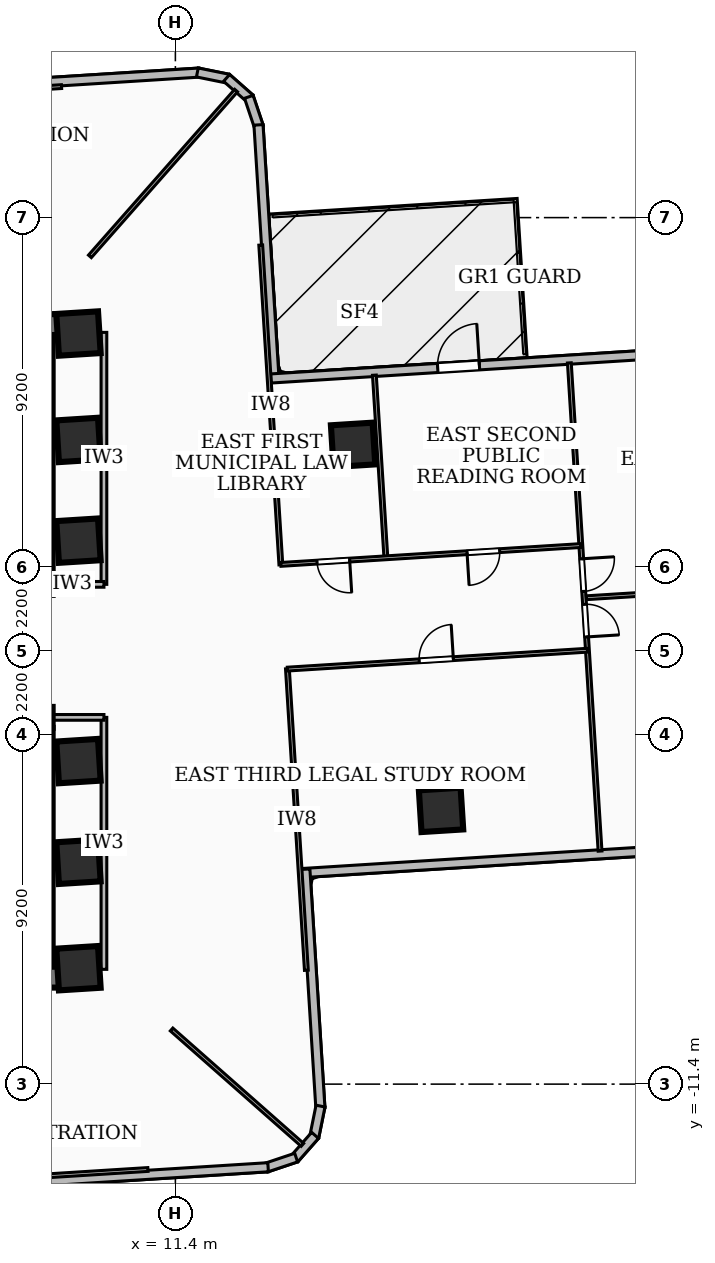
"""IFC4 building model, lengths in metres.
Left out: names, types, materials, properties, quantities, classifications, styles, units other than length and angle.
Written with IfcOpenShell. Run it as: python <this file> out.ifc"""

import sys

from ifc_helpers import new_model, si_unit, direction, frame, frame_2d, origin, origin_2d, place, context, subcontext, project, spatial, rectangle, extrude, element, fill, save


model = new_model("IFC4")
c1 = context("Model", 3, precision=1e-05, world=origin(), true_north=direction((0.0, 1.0)))
c2 = subcontext(c1, "Body", "Model", "MODEL_VIEW")
j1 = project(units=[si_unit("LENGTHUNIT", "METRE"), si_unit("PLANEANGLEUNIT", "RADIAN")], contexts=[c1])
p1 = place(None, origin())
s1 = spatial("IfcSite", under=j1, at=p1, CompositionType="ELEMENT")
p2 = place(p1, origin())
s2 = spatial("IfcBuilding", under=s1, at=p2, CompositionType="ELEMENT")
p3 = place(p2, frame((0.0, 0.0, 49.68)))
s3 = spatial("IfcBuildingStorey", under=s2, at=p3, CompositionType="ELEMENT", Elevation=49.68)
p4 = place(p3, frame((-8.78, 8.585, 0.0), z_axis=(0.0, 0.0, 1.0), x_axis=(1.0, 0.0, 0.0)))
e1 = element("IfcWall", 1, at=p4, inside=s3, PredefinedType="SHEAR", context=c2, shape_type="SweptSolid", body=[
    extrude(rectangle(XDim=17.56, YDim=0.55, at=frame_2d((8.78, 0.0))), origin(), (0.0, 0.0, 1.0), 3.32),
])
p5 = place(p3, frame((8.17, 1.75, 0.0), z_axis=(0.0, 0.0, 1.0), x_axis=(-1.0, 0.0, 0.0)))
e2 = element("IfcWall", 2, at=p5, inside=s3, PredefinedType="SHEAR", context=c2, shape_type="SweptSolid", body=[
    extrude(rectangle(XDim=16.34, YDim=0.55, at=frame_2d((8.17, 0.0))), origin(), (0.0, 0.0, 1.0), 3.32),
])
p6 = place(p5, frame((7.45, 0.0, 0.0)))
e3 = element("IfcOpeningElement", 3, at=p6, cuts=e2, PredefinedType="OPENING", context=c2, shape_type="SweptSolid", body=[
    extrude(rectangle(XDim=1.0, YDim=2.1, at=frame_2d((0.5, 1.05))), frame((0.0, 0.285, 0.0), z_axis=(0.0, -1.0, 0.0), x_axis=(1.0, 0.0, 0.0)), (0.0, 0.0, 1.0), 0.57),
])
p7 = place(p5, frame((3.85, 0.0, 0.0)))
e4 = element("IfcOpeningElement", 4, at=p7, cuts=e2, PredefinedType="OPENING", context=c2, shape_type="SweptSolid", body=[
    extrude(rectangle(XDim=0.9, YDim=2.06, at=frame_2d((0.45, 1.03))), frame((0.0, 0.285, 0.0), z_axis=(0.0, -1.0, 0.0), x_axis=(1.0, 0.0, 0.0)), (0.0, 0.0, 1.0), 0.57),
])
p8 = place(p5, frame((2.35, 0.0, 0.0)))
e5 = element("IfcOpeningElement", 5, at=p8, cuts=e2, PredefinedType="OPENING", context=c2, shape_type="SweptSolid", body=[
    extrude(rectangle(XDim=0.9, YDim=2.06, at=frame_2d((0.45, 1.03))), frame((0.0, 0.285, 0.0), z_axis=(0.0, -1.0, 0.0), x_axis=(1.0, 0.0, 0.0)), (0.0, 0.0, 1.0), 0.57),
])
p9 = place(p5, frame((0.8, 0.0, 0.0)))
e6 = element("IfcOpeningElement", 6, at=p9, cuts=e2, PredefinedType="OPENING", context=c2, shape_type="SweptSolid", body=[
    extrude(rectangle(XDim=0.9, YDim=2.06, at=frame_2d((0.45, 1.03))), frame((0.0, 0.285, 0.0), z_axis=(0.0, -1.0, 0.0), x_axis=(1.0, 0.0, 0.0)), (0.0, 0.0, 1.0), 0.57),
])
p10 = place(p3, frame((7.895, 8.31, 0.0), z_axis=(0.0, 0.0, 1.0), x_axis=(0.0, -1.0, 0.0)))
e7 = element("IfcWall", 7, at=p10, inside=s3, PredefinedType="SHEAR", context=c2, shape_type="SweptSolid", body=[
    extrude(rectangle(XDim=6.285, YDim=0.55, at=frame_2d((3.143, 0.0))), origin(), (0.0, 0.0, 1.0), 3.32),
])
p11 = place(p3, frame((8.78, -8.585, 0.0), z_axis=(0.0, 0.0, 1.0), x_axis=(-1.0, 0.0, 0.0)))
e8 = element("IfcWall", 8, at=p11, inside=s3, PredefinedType="SHEAR", context=c2, shape_type="SweptSolid", body=[
    extrude(rectangle(XDim=17.56, YDim=0.55, at=frame_2d((8.78, 0.0))), origin(), (0.0, 0.0, 1.0), 3.32),
])
p12 = place(p3, frame((-8.17, -1.75, 0.0), z_axis=(0.0, 0.0, 1.0), x_axis=(1.0, 0.0, 0.0)))
e9 = element("IfcWall", 9, at=p12, inside=s3, PredefinedType="SHEAR", context=c2, shape_type="SweptSolid", body=[
    extrude(rectangle(XDim=16.34, YDim=0.55, at=frame_2d((8.17, 0.0))), origin(), (0.0, 0.0, 1.0), 3.32),
])
p13 = place(p12, frame((7.45, 0.0, 0.0)))
e10 = element("IfcOpeningElement", 10, at=p13, cuts=e9, PredefinedType="OPENING", context=c2, shape_type="SweptSolid", body=[
    extrude(rectangle(XDim=1.0, YDim=2.1, at=frame_2d((0.5, 1.05))), frame((0.0, 0.285, 0.0), z_axis=(0.0, -1.0, 0.0), x_axis=(1.0, 0.0, 0.0)), (0.0, 0.0, 1.0), 0.57),
])
p14 = place(p12, frame((10.965, 0.0, 0.0)))
e11 = element("IfcOpeningElement", 11, at=p14, cuts=e9, PredefinedType="OPENING", context=c2, shape_type="SweptSolid", body=[
    extrude(rectangle(XDim=1.05, YDim=2.15, at=frame_2d((0.525, 1.075))), frame((0.0, 0.285, 0.0), z_axis=(0.0, -1.0, 0.0), x_axis=(1.0, 0.0, 0.0)), (0.0, 0.0, 1.0), 0.57),
])
p15 = place(p12, frame((12.525, 0.0, 0.0)))
e12 = element("IfcOpeningElement", 12, at=p15, cuts=e9, PredefinedType="OPENING", context=c2, shape_type="SweptSolid", body=[
    extrude(rectangle(XDim=1.05, YDim=2.15, at=frame_2d((0.525, 1.075))), frame((0.0, 0.285, 0.0), z_axis=(0.0, -1.0, 0.0), x_axis=(1.0, 0.0, 0.0)), (0.0, 0.0, 1.0), 0.57),
])
p16 = place(p12, frame((14.085, 0.0, 0.0)))
e13 = element("IfcOpeningElement", 13, at=p16, cuts=e9, PredefinedType="OPENING", context=c2, shape_type="SweptSolid", body=[
    extrude(rectangle(XDim=1.05, YDim=2.15, at=frame_2d((0.525, 1.075))), frame((0.0, 0.285, 0.0), z_axis=(0.0, -1.0, 0.0), x_axis=(1.0, 0.0, 0.0)), (0.0, 0.0, 1.0), 0.57),
])
p17 = place(p3, frame((7.895, -2.025, 0.0), z_axis=(0.0, 0.0, 1.0), x_axis=(0.0, -1.0, 0.0)))
e14 = element("IfcWall", 14, at=p17, inside=s3, PredefinedType="SHEAR", context=c2, shape_type="SweptSolid", body=[
    extrude(rectangle(XDim=6.285, YDim=0.55, at=frame_2d((3.143, 0.0))), origin(), (0.0, 0.0, 1.0), 3.32),
])
for number, where, z_axis, x_axis in (
    (15, (8.85, -5.55, 0.0), (0.0, 0.0, 1.0), (0.998, 0.063, 0.0)),
    (16, (8.85, -2.9, 0.0), (0.0, 0.0, 1.0), (0.998, 0.063, 0.0)),
    (17, (8.85, 2.9, 0.0), (0.0, 0.0, 1.0), (0.998, 0.063, 0.0)),
    (18, (8.85, 5.55, 0.0), (0.0, 0.0, 1.0), (0.998, 0.063, 0.0)),
    (19, (8.85, -8.35, 0.0), (0.0, 0.0, 1.0), (0.998, 0.063, 0.0)),
    (20, (8.85, 8.35, 0.0), (0.0, 0.0, 1.0), (0.998, 0.063, 0.0)),
    (21, (18.391, -4.184, 0.0), (0.0, 0.0, 1.0), (0.998, 0.063, 0.0)),
    (22, (16.076, 5.421, 0.0), (0.0, 0.0, 1.0), (0.998, 0.063, 0.0)),
):
    element("IfcColumn", number, at=place(p3, frame(where, z_axis=z_axis, x_axis=x_axis)), inside=s3, PredefinedType="COLUMN", context=c2, shape_type="SweptSolid", body=[
        extrude(rectangle(XDim=1.1, YDim=1.1, at=origin_2d()), origin(), (0.0, 0.0, 1.0), 3.6),
    ])
p18 = place(p3, frame((5.745, 14.82, 0.0), z_axis=(0.0, 0.0, 1.0), x_axis=(0.998019696231, 0.062902193405, 0.0)))
e23 = element("IfcWall", 23, at=p18, inside=s3, PredefinedType="SOLIDWALL", context=c2, shape_type="SweptSolid", body=[
    extrude(rectangle(XDim=6.295, YDim=0.24, at=frame_2d((3.148, 0.0))), origin(), (0.0, 0.0, 1.0), 2.401),
])
p19 = place(p3, frame((11.978, 15.219, 0.0), z_axis=(0.0, 0.0, 1.0), x_axis=(0.980057147523, -0.198715846348, 0.0)))
e24 = element("IfcWall", 24, at=p19, inside=s3, PredefinedType="SOLIDWALL", context=c2, shape_type="SweptSolid", body=[
    extrude(rectangle(XDim=0.831, YDim=0.24, at=frame_2d((0.415, 0.0))), origin(), (0.0, 0.0, 1.0), 3.32),
])
p20 = place(p3, frame((12.748, 15.076, 0.0), z_axis=(0.0, 0.0, 1.0), x_axis=(0.750588777208, -0.66076961759, 0.0)))
e25 = element("IfcWall", 25, at=p20, inside=s3, PredefinedType="SOLIDWALL", context=c2, shape_type="SweptSolid", body=[
    extrude(rectangle(XDim=0.815, YDim=0.24, at=frame_2d((0.408, 0.0))), origin(), (0.0, 0.0, 1.0), 3.32),
])
p21 = place(p3, frame((13.333, 14.578, 0.0), z_axis=(0.0, 0.0, 1.0), x_axis=(0.317992207862, -0.948093326492, 0.0)))
e26 = element("IfcWall", 26, at=p21, inside=s3, PredefinedType="SOLIDWALL", context=c2, shape_type="SweptSolid", body=[
    extrude(rectangle(XDim=0.83, YDim=0.24, at=frame_2d((0.415, 0.0))), origin(), (0.0, 0.0, 1.0), 3.32),
])
p22 = place(p3, frame((13.587, 13.84, 0.0), z_axis=(0.0, 0.0, 1.0), x_axis=(0.062867237505, -0.998021898782, 0.0)))
e27 = element("IfcWall", 27, at=p22, inside=s3, PredefinedType="SOLIDWALL", context=c2, shape_type="SweptSolid", body=[
    extrude(rectangle(XDim=6.777, YDim=0.24, at=frame_2d((3.388, 0.0))), origin(), (0.0, 0.0, 1.0), 2.624),
])
p23 = place(p3, frame((13.911, 7.167, 0.0), z_axis=(0.0, 0.0, 1.0), x_axis=(0.99802143782, 0.062874554885, 0.0)))
e28 = element("IfcWall", 28, at=p23, inside=s3, PredefinedType="SOLIDWALL", context=c2, shape_type="SweptSolid", body=[
    extrude(rectangle(XDim=16.875, YDim=0.24, at=frame_2d((8.438, 0.0))), origin(), (0.0, 0.0, 1.0), 2.624),
])
p24 = place(p23, frame((4.4, 0.0, 0.0)))
e29 = element("IfcOpeningElement", 29, at=p24, cuts=e28, PredefinedType="OPENING", context=c2, shape_type="SweptSolid", body=[
    extrude(rectangle(XDim=1.1, YDim=2.1, at=frame_2d((0.55, 1.05))), frame((0.0, 0.13, 0.0), z_axis=(0.0, -1.0, 0.0), x_axis=(1.0, 0.0, 0.0)), (0.0, 0.0, 1.0), 0.26),
])
p25 = place(p3, frame((31.572, -4.787, 0.0), z_axis=(0.0, 0.0, 1.0), x_axis=(-0.998025974342, -0.062802504235, 0.0)))
e30 = element("IfcWall", 30, at=p25, inside=s3, PredefinedType="SOLIDWALL", context=c2, shape_type="SweptSolid", body=[
    extrude(rectangle(XDim=16.875, YDim=0.24, at=frame_2d((8.438, 0.0))), origin(), (0.0, 0.0, 1.0), 3.32),
])
p26 = place(p25, frame((1.1, 0.0, 0.85)))
e31 = element("IfcOpeningElement", 31, at=p26, cuts=e30, PredefinedType="OPENING", context=c2, shape_type="SweptSolid", body=[
    extrude(rectangle(XDim=2.4, YDim=2.1, at=frame_2d((1.2, 1.05))), frame((0.0, 0.13, 0.0), z_axis=(0.0, -1.0, 0.0), x_axis=(1.0, 0.0, 0.0)), (0.0, 0.0, 1.0), 0.26),
])
p27 = place(p3, frame((14.82, -5.745, 0.0), z_axis=(0.0, 0.0, 1.0), x_axis=(0.062902193405, -0.998019696231, 0.0)))
e32 = element("IfcWall", 32, at=p27, inside=s3, PredefinedType="SOLIDWALL", context=c2, shape_type="SweptSolid", body=[
    extrude(rectangle(XDim=6.295, YDim=0.24, at=frame_2d((3.148, 0.0))), origin(), (0.0, 0.0, 1.0), 3.32),
])
p28 = place(p3, frame((15.219, -11.978, 0.0), z_axis=(0.0, 0.0, 1.0), x_axis=(-0.198715846348, -0.980057147523, 0.0)))
e33 = element("IfcWall", 33, at=p28, inside=s3, PredefinedType="SOLIDWALL", context=c2, shape_type="SweptSolid", body=[
    extrude(rectangle(XDim=0.831, YDim=0.24, at=frame_2d((0.415, 0.0))), origin(), (0.0, 0.0, 1.0), 3.32),
])
p29 = place(p3, frame((15.076, -12.748, 0.0), z_axis=(0.0, 0.0, 1.0), x_axis=(-0.66076961759, -0.750588777208, 0.0)))
e34 = element("IfcWall", 34, at=p29, inside=s3, PredefinedType="SOLIDWALL", context=c2, shape_type="SweptSolid", body=[
    extrude(rectangle(XDim=0.815, YDim=0.24, at=frame_2d((0.408, 0.0))), origin(), (0.0, 0.0, 1.0), 3.32),
])
p30 = place(p3, frame((14.578, -13.333, 0.0), z_axis=(0.0, 0.0, 1.0), x_axis=(-0.948093326492, -0.317992207862, 0.0)))
e35 = element("IfcWall", 35, at=p30, inside=s3, PredefinedType="SOLIDWALL", context=c2, shape_type="SweptSolid", body=[
    extrude(rectangle(XDim=0.83, YDim=0.24, at=frame_2d((0.415, 0.0))), origin(), (0.0, 0.0, 1.0), 3.32),
])
p31 = place(p3, frame((13.84, -13.587, 0.0), z_axis=(0.0, 0.0, 1.0), x_axis=(-0.998021898782, -0.062867237505, 0.0)))
e36 = element("IfcWall", 36, at=p31, inside=s3, PredefinedType="SOLIDWALL", context=c2, shape_type="SweptSolid", body=[
    extrude(rectangle(XDim=6.777, YDim=0.24, at=frame_2d((3.388, 0.0))), origin(), (0.0, 0.0, 1.0), 3.32),
])
p32 = place(p3, frame((9.52, 1.75, 0.0), z_axis=(0.0, 0.0, 1.0), x_axis=(0.0, 1.0, 0.0)))
e37 = element("IfcWall", 37, at=p32, inside=s3, PredefinedType="PARTITIONING", context=c2, shape_type="SweptSolid", body=[
    extrude(rectangle(XDim=6.63, YDim=0.15, at=frame_2d((3.315, 0.0))), origin(), (0.0, 0.0, 1.0), 2.401),
])
p33 = place(p3, frame((7.85, 1.75, 0.0), z_axis=(0.0, 0.0, 1.0), x_axis=(1.0, 0.0, 0.0)))
e38 = element("IfcWall", 38, at=p33, inside=s3, PredefinedType="PARTITIONING", context=c2, shape_type="SweptSolid", body=[
    extrude(rectangle(XDim=1.67, YDim=0.15, at=frame_2d((0.835, 0.0))), origin(), (0.0, 0.0, 1.0), 2.385),
])
p34 = place(p3, frame((9.52, -8.38, 0.0), z_axis=(0.0, 0.0, 1.0), x_axis=(0.0, 1.0, 0.0)))
e39 = element("IfcWall", 39, at=p34, inside=s3, PredefinedType="PARTITIONING", context=c2, shape_type="SweptSolid", body=[
    extrude(rectangle(XDim=6.63, YDim=0.15, at=frame_2d((3.315, 0.0))), origin(), (0.0, 0.0, 1.0), 2.401),
])
p35 = place(p3, frame((7.85, -1.75, 0.0), z_axis=(0.0, 0.0, 1.0), x_axis=(1.0, 0.0, 0.0)))
e40 = element("IfcWall", 40, at=p35, inside=s3, PredefinedType="PARTITIONING", context=c2, shape_type="SweptSolid", body=[
    extrude(rectangle(XDim=1.67, YDim=0.15, at=frame_2d((0.835, 0.0))), origin(), (0.0, 0.0, 1.0), 2.385),
])
p36 = place(p3, frame((9.151, 10.38, 0.0), z_axis=(0.0, 0.0, 1.0), x_axis=(0.661373124857, 0.750057057641, 0.0)))
e41 = element("IfcWall", 41, at=p36, inside=s3, PredefinedType="PARTITIONING", context=c2, shape_type="SweptSolid", body=[
    extrude(rectangle(XDim=5.817, YDim=0.1, at=frame_2d((2.908, 0.0))), origin(), (0.0, 0.0, 1.0), 2.624),
])
p37 = place(p3, frame((11.3, -9.962, 0.0), z_axis=(0.0, 0.0, 1.0), x_axis=(0.750020974917, -0.661414043686, 0.0)))
e42 = element("IfcWall", 42, at=p37, inside=s3, PredefinedType="PARTITIONING", context=c2, shape_type="SweptSolid", body=[
    extrude(rectangle(XDim=4.59, YDim=0.1, at=frame_2d((2.295, 0.0))), origin(), (0.0, 0.0, 1.0), 3.32),
])
p38 = place(p3, frame((14.176, 2.265, 0.0), z_axis=(0.0, 0.0, 1.0), x_axis=(-0.062875924382, 0.998021351542, 0.0)))
e43 = element("IfcWall", 43, at=p38, inside=s3, PredefinedType="PARTITIONING", context=c2, shape_type="SweptSolid", body=[
    extrude(rectangle(XDim=8.43, YDim=0.1, at=frame_2d((4.215, 0.0))), origin(), (0.0, 0.0, 1.0), 2.401),
])
p39 = place(p3, frame((14.847, -8.404, 0.0), z_axis=(0.0, 0.0, 1.0), x_axis=(-0.062772139706, 0.998027884619, 0.0)))
e44 = element("IfcWall", 44, at=p39, inside=s3, PredefinedType="PARTITIONING", context=c2, shape_type="SweptSolid", body=[
    extrude(rectangle(XDim=7.95, YDim=0.1, at=frame_2d((3.975, 0.0))), origin(), (0.0, 0.0, 1.0), 2.401),
])
p40 = place(p3, frame((16.938, 2.468, 0.0), z_axis=(0.0, 0.0, 1.0), x_axis=(-0.062774483496, 0.998027737201, 0.0)))
e45 = element("IfcWall", 45, at=p40, inside=s3, PredefinedType="PARTITIONING", context=c2, shape_type="SweptSolid", body=[
    extrude(rectangle(XDim=4.795, YDim=0.1, at=frame_2d((2.398, 0.0))), origin(), (0.0, 0.0, 1.0), 2.401),
])
p41 = place(p3, frame((22.07, 2.771, 0.0), z_axis=(0.0, 0.0, 1.0), x_axis=(-0.998031627252, -0.062712606425, 0.0)))
e46 = element("IfcWall", 46, at=p41, inside=s3, PredefinedType="PARTITIONING", context=c2, shape_type="SweptSolid", body=[
    extrude(rectangle(XDim=7.911, YDim=0.1, at=frame_2d((3.955, 0.0))), origin(), (0.0, 0.0, 1.0), 3.32),
])
p42 = place(p41, frame((6.096, 0.0, 0.0)))
e47 = element("IfcOpeningElement", 47, at=p42, cuts=e46, PredefinedType="OPENING", context=c2, shape_type="SweptSolid", body=[
    extrude(rectangle(XDim=0.86, YDim=2.04, at=frame_2d((0.43, 1.02))), frame((0.0, 0.06, 0.0), z_axis=(0.0, -1.0, 0.0), x_axis=(1.0, 0.0, 0.0)), (0.0, 0.0, 1.0), 0.12),
])
p43 = place(p41, frame((2.141, 0.0, 0.0)))
e48 = element("IfcOpeningElement", 48, at=p43, cuts=e46, PredefinedType="OPENING", context=c2, shape_type="SweptSolid", body=[
    extrude(rectangle(XDim=0.86, YDim=2.04, at=frame_2d((0.43, 1.02))), frame((0.0, 0.06, 0.0), z_axis=(0.0, -1.0, 0.0), x_axis=(1.0, 0.0, 0.0)), (0.0, 0.0, 1.0), 0.12),
])
p44 = place(p3, frame((14.348, -0.48, 0.0), z_axis=(0.0, 0.0, 1.0), x_axis=(0.998023893104, 0.062835569496, 0.0)))
e49 = element("IfcWall", 49, at=p44, inside=s3, PredefinedType="PARTITIONING", context=c2, shape_type="SweptSolid", body=[
    extrude(rectangle(XDim=7.911, YDim=0.1, at=frame_2d((3.955, 0.0))), origin(), (0.0, 0.0, 1.0), 3.32),
])
p45 = place(p44, frame((3.475, 0.0, 0.0)))
e50 = element("IfcOpeningElement", 50, at=p45, cuts=e49, PredefinedType="OPENING", context=c2, shape_type="SweptSolid", body=[
    extrude(rectangle(XDim=0.9, YDim=2.06, at=frame_2d((0.45, 1.03))), frame((0.0, 0.06, 0.0), z_axis=(0.0, -1.0, 0.0), x_axis=(1.0, 0.0, 0.0)), (0.0, 0.0, 1.0), 0.12),
])
p46 = place(p3, frame((22.216, 1.398, 0.0), z_axis=(0.0, 0.0, 1.0), x_axis=(0.998025462108, 0.062810643876, 0.0)))
e51 = element("IfcWall", 51, at=p46, inside=s3, PredefinedType="PARTITIONING", context=c2, shape_type="SweptSolid", body=[
    extrude(rectangle(XDim=10.335, YDim=0.1, at=frame_2d((5.168, 0.0))), origin(), (0.0, 0.0, 1.0), 2.812),
])
p47 = place(p3, frame((21.767, 7.577, 0.0), z_axis=(0.0, 0.0, 1.0), x_axis=(0.062769180357, -0.998028070746, 0.0)))
e52 = element("IfcWall", 52, at=p47, inside=s3, PredefinedType="PARTITIONING", context=c2, shape_type="SweptSolid", body=[
    extrude(rectangle(XDim=12.87, YDim=0.1, at=frame_2d((6.435, 0.0))), origin(), (0.0, 0.0, 1.0), 2.401),
])
p48 = place(p47, frame((6.365, 0.0, 0.0)))
e53 = element("IfcOpeningElement", 53, at=p48, cuts=e52, PredefinedType="OPENING", context=c2, shape_type="SweptSolid", body=[
    extrude(rectangle(XDim=0.86, YDim=2.04, at=frame_2d((0.43, 1.02))), frame((0.0, 0.06, 0.0), z_axis=(0.0, -1.0, 0.0), x_axis=(1.0, 0.0, 0.0)), (0.0, 0.0, 1.0), 0.12),
])
p49 = place(p47, frame((5.165, 0.0, 0.0)))
e54 = element("IfcOpeningElement", 54, at=p49, cuts=e52, PredefinedType="OPENING", context=c2, shape_type="SweptSolid", body=[
    extrude(rectangle(XDim=0.86, YDim=2.04, at=frame_2d((0.43, 1.02))), frame((0.0, 0.06, 0.0), z_axis=(0.0, -1.0, 0.0), x_axis=(1.0, 0.0, 0.0)), (0.0, 0.0, 1.0), 0.12),
])
p50 = place(p3, frame((8.404, 14.847, 0.0), z_axis=(0.0, 0.0, 1.0), x_axis=(-0.998027884619, -0.062772139706, 0.0)))
e55 = element("IfcWall", 55, at=p50, inside=s3, PredefinedType="PARTITIONING", context=c2, shape_type="SweptSolid", body=[
    extrude(rectangle(XDim=7.95, YDim=0.1, at=frame_2d((3.975, 0.0))), origin(), (0.0, 0.0, 1.0), 2.401),
])
p51 = place(p3, frame((2.265, -14.176, 0.0), z_axis=(0.0, 0.0, 1.0), x_axis=(0.998021351542, 0.062875924382, 0.0)))
e56 = element("IfcWall", 56, at=p51, inside=s3, PredefinedType="PARTITIONING", context=c2, shape_type="SweptSolid", body=[
    extrude(rectangle(XDim=8.43, YDim=0.1, at=frame_2d((4.215, 0.0))), origin(), (0.0, 0.0, 1.0), 2.401),
])
p52 = place(p24, origin())
e57 = element("IfcDoor", 57, at=p52, inside=s3, OperationType="SINGLE_SWING_RIGHT", PredefinedType="DOOR", context=c2, shape_type="SweptSolid", body=[
    extrude(rectangle(XDim=1.1, YDim=2.1, at=frame_2d((0.55, 1.05))), frame((0.0, 0.025, 0.0), z_axis=(0.0, -1.0, 0.0), x_axis=(1.0, 0.0, 0.0)), (0.0, 0.0, 1.0), 0.05),
])
fill(e29, e57)
p53 = place(p42, origin())
e58 = element("IfcDoor", 58, at=p53, inside=s3, OperationType="SINGLE_SWING_LEFT", PredefinedType="DOOR", context=c2, shape_type="SweptSolid", body=[
    extrude(rectangle(XDim=0.86, YDim=2.04, at=frame_2d((0.43, 1.02))), frame((0.0, 0.025, 0.0), z_axis=(0.0, -1.0, 0.0), x_axis=(1.0, 0.0, 0.0)), (0.0, 0.0, 1.0), 0.05),
])
fill(e47, e58)
p54 = place(p43, origin())
e59 = element("IfcDoor", 59, at=p54, inside=s3, OperationType="SINGLE_SWING_RIGHT", PredefinedType="DOOR", context=c2, shape_type="SweptSolid", body=[
    extrude(rectangle(XDim=0.86, YDim=2.04, at=frame_2d((0.43, 1.02))), frame((0.0, 0.025, 0.0), z_axis=(0.0, -1.0, 0.0), x_axis=(1.0, 0.0, 0.0)), (0.0, 0.0, 1.0), 0.05),
])
fill(e48, e59)
p55 = place(p45, origin())
e60 = element("IfcDoor", 60, at=p55, inside=s3, OperationType="SINGLE_SWING_RIGHT", PredefinedType="DOOR", context=c2, shape_type="SweptSolid", body=[
    extrude(rectangle(XDim=0.9, YDim=2.06, at=frame_2d((0.45, 1.03))), frame((0.0, 0.025, 0.0), z_axis=(0.0, -1.0, 0.0), x_axis=(1.0, 0.0, 0.0)), (0.0, 0.0, 1.0), 0.05),
])
fill(e50, e60)
p56 = place(p48, origin())
e61 = element("IfcDoor", 61, at=p56, inside=s3, OperationType="SINGLE_SWING_RIGHT", PredefinedType="DOOR", context=c2, shape_type="SweptSolid", body=[
    extrude(rectangle(XDim=0.86, YDim=2.04, at=frame_2d((0.43, 1.02))), frame((0.0, 0.025, 0.0), z_axis=(0.0, -1.0, 0.0), x_axis=(1.0, 0.0, 0.0)), (0.0, 0.0, 1.0), 0.05),
])
fill(e53, e61)
p57 = place(p49, origin())
e62 = element("IfcDoor", 62, at=p57, inside=s3, OperationType="SINGLE_SWING_LEFT", PredefinedType="DOOR", context=c2, shape_type="SweptSolid", body=[
    extrude(rectangle(XDim=0.86, YDim=2.04, at=frame_2d((0.43, 1.02))), frame((0.0, 0.025, 0.0), z_axis=(0.0, -1.0, 0.0), x_axis=(1.0, 0.0, 0.0)), (0.0, 0.0, 1.0), 0.05),
])
fill(e54, e62)
save(model, sys.argv[1])
